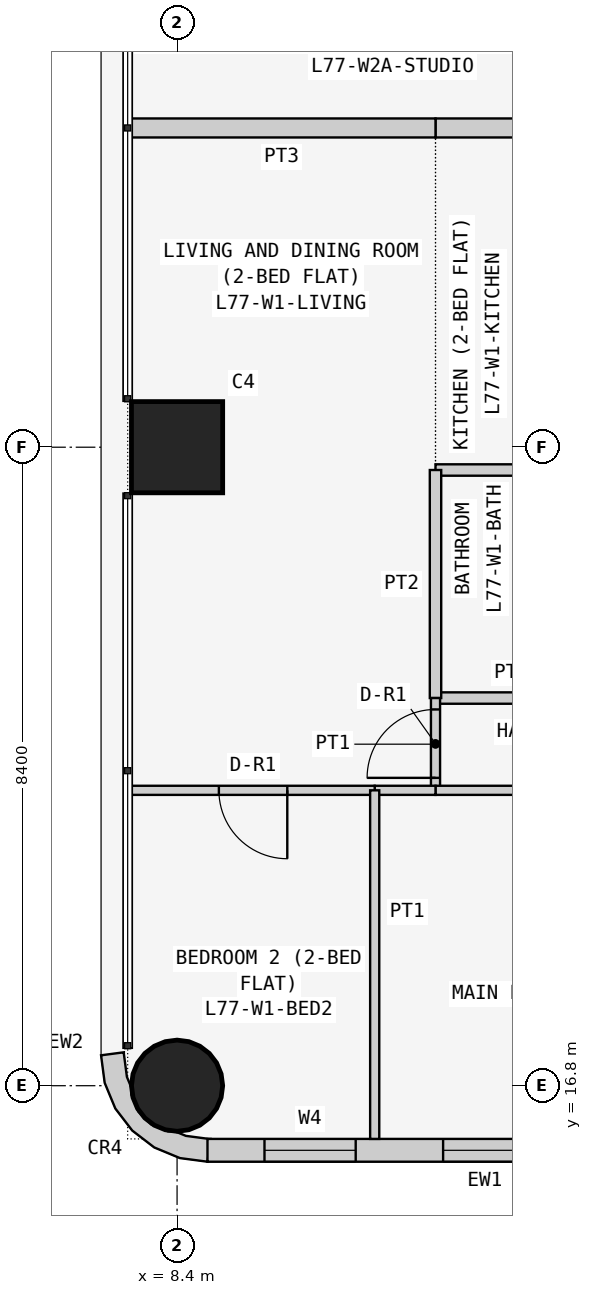
"""IFC4 building model, lengths in metres.
Left out: names, types, materials, properties, quantities, classifications, styles, units other than length and angle.
Written with IfcOpenShell. Run it as: python <this file> out.ifc"""

import sys

from ifc_helpers import new_model, si_unit, direction, frame, frame_2d, origin, origin_2d, place, context, subcontext, project, spatial, polyline, rectangle, circle, outline, extrude, element, fill, save


model = new_model("IFC4")
c1 = context("Model", 3, precision=1e-05, world=origin(), true_north=direction((0.0, 1.0)))
c2 = subcontext(c1, "Body", "Model", "MODEL_VIEW")
j1 = project(units=[si_unit("LENGTHUNIT", "METRE"), si_unit("PLANEANGLEUNIT", "RADIAN")], contexts=[c1])
p1 = place(None, origin())
s1 = spatial("IfcSite", under=j1, at=p1, CompositionType="ELEMENT")
p2 = place(p1, origin())
s2 = spatial("IfcBuilding", under=s1, at=p2, CompositionType="ELEMENT")
p3 = place(p2, frame((0.0, 0.0, 293.7)))
s3 = spatial("IfcBuildingStorey", under=s2, at=p3, CompositionType="ELEMENT", Elevation=293.7)
p4 = place(p3, frame((8.4, 16.8, 0.0), z_axis=(0.0, 0.0, 1.0), x_axis=(1.0, 0.0, 0.0)))
e1 = element("IfcColumn", 1, at=p4, inside=s3, PredefinedType="COLUMN", context=c2, shape_type="SweptSolid", body=[
    extrude(circle(Radius=0.6, at=origin_2d()), origin(), (0.0, 0.0, 1.0), 3.6),
])
p5 = place(p3, frame((8.4, 25.2, 0.0), z_axis=(0.0, 0.0, 1.0), x_axis=(1.0, 0.0, 0.0)))
e2 = element("IfcColumn", 2, at=p5, inside=s3, PredefinedType="COLUMN", context=c2, shape_type="SweptSolid", body=[
    extrude(rectangle(XDim=1.2, YDim=1.2, at=origin_2d()), origin(), (0.0, 0.0, 1.0), 3.6),
])
p6 = place(p3, frame((8.8, 15.95, 0.0), z_axis=(0.0, 0.0, 1.0), x_axis=(1.0, 0.0, 0.0)))
e3 = element("IfcWall", 3, at=p6, inside=s3, PredefinedType="SOLIDWALL", context=c2, shape_type="SweptSolid", body=[
    extrude(rectangle(XDim=7.3, YDim=0.3, at=frame_2d((3.65, 0.0))), origin(), (0.0, 0.0, 1.0), 3.45),
])
p7 = place(p6, frame((3.1, 0.0, 0.9)))
e4 = element("IfcOpeningElement", 4, at=p7, cuts=e3, PredefinedType="OPENING", context=c2, shape_type="SweptSolid", body=[
    extrude(rectangle(XDim=2.4, YDim=1.5, at=frame_2d((1.2, 0.75))), frame((0.0, 0.16, 0.0), z_axis=(0.0, -1.0, 0.0), x_axis=(1.0, 0.0, 0.0)), (0.0, 0.0, 1.0), 0.32),
])
p8 = place(p6, frame((0.75, 0.0, 0.9)))
e5 = element("IfcOpeningElement", 5, at=p8, cuts=e3, PredefinedType="OPENING", context=c2, shape_type="SweptSolid", body=[
    extrude(rectangle(XDim=1.2, YDim=1.5, at=frame_2d((0.6, 0.75))), frame((0.0, 0.16, 0.0), z_axis=(0.0, -1.0, 0.0), x_axis=(1.0, 0.0, 0.0)), (0.0, 0.0, 1.0), 0.32),
])
p9 = place(p3, frame((7.824, 17.162, 0.0), z_axis=(0.0, 0.0, 1.0), x_axis=(-0.707106781187, -0.707106781187, 0.0)))
e6 = element("IfcWall", 6, at=p9, inside=s3, PredefinedType="SOLIDWALL", context=c2, shape_type="SweptSolid", body=[
    extrude(outline(polyline([(0.047, 1.454), (0.233, 1.212), (0.292, 1.069), (0.358, 1.003), (0.449, 0.782), (0.449, 0.543), (0.358, 0.323), (0.292, 0.257), (0.233, 0.114), (0.047, -0.129), (0.033, -0.143), (0.273, -0.327), (0.495, -0.037), (0.635, 0.301), (0.683, 0.663), (0.635, 1.025), (0.495, 1.363), (0.273, 1.653), (0.033, 1.469), (0.047, 1.454)])), origin(), (0.0, 0.0, 1.0), 3.45),
])
p10 = place(p3, frame((11.8, 24.9, 0.0), z_axis=(0.0, 0.0, 1.0), x_axis=(1.0, 0.0, 0.0)))
e7 = element("IfcWall", 7, at=p10, inside=s3, PredefinedType="PARTITIONING", context=c2, shape_type="SweptSolid", body=[
    extrude(rectangle(XDim=2.0, YDim=0.15, at=frame_2d((1.0, 0.0))), origin(), (0.0, 0.0, 1.0), 3.45),
])
p11 = place(p3, frame((13.8, 29.4, 0.0), z_axis=(0.0, 0.0, 1.0), x_axis=(-1.0, 0.0, 0.0)))
e8 = element("IfcWall", 8, at=p11, inside=s3, PredefinedType="PARTITIONING", context=c2, shape_type="SweptSolid", body=[
    extrude(rectangle(XDim=2.0, YDim=0.25, at=frame_2d((1.0, 0.0))), origin(), (0.0, 0.0, 1.0), 3.45),
])
p12 = place(p3, frame((11.8, 21.9, 0.0), z_axis=(0.0, 0.0, 1.0), x_axis=(1.0, 0.0, 0.0)))
e9 = element("IfcWall", 9, at=p12, inside=s3, PredefinedType="PARTITIONING", context=c2, shape_type="SweptSolid", body=[
    extrude(rectangle(XDim=2.0, YDim=0.15, at=frame_2d((1.0, 0.0))), origin(), (0.0, 0.0, 1.0), 3.45),
])
p13 = place(p3, frame((11.8, 24.9, 0.0), z_axis=(0.0, 0.0, 1.0), x_axis=(0.0, -1.0, 0.0)))
e10 = element("IfcWall", 10, at=p13, inside=s3, PredefinedType="PARTITIONING", context=c2, shape_type="SweptSolid", body=[
    extrude(rectangle(XDim=3.0, YDim=0.15, at=frame_2d((1.5, 0.0))), origin(), (0.0, 0.0, 1.0), 3.45),
])
p14 = place(p3, frame((11.8, 21.9, 0.0), z_axis=(0.0, 0.0, 1.0), x_axis=(0.0, -1.0, 0.0)))
e11 = element("IfcWall", 11, at=p14, inside=s3, PredefinedType="PARTITIONING", context=c2, shape_type="SweptSolid", body=[
    extrude(rectangle(XDim=1.214, YDim=0.12, at=frame_2d((0.607, 0.0))), origin(), (0.0, 0.0, 1.0), 3.45),
])
p15 = place(p14, frame((0.15, 0.0, 0.0)))
e12 = element("IfcOpeningElement", 12, at=p15, cuts=e11, PredefinedType="OPENING", context=c2, shape_type="SweptSolid", body=[
    extrude(rectangle(XDim=0.9, YDim=2.1, at=frame_2d((0.45, 1.05))), frame((0.0, 0.07, 0.0), z_axis=(0.0, -1.0, 0.0), x_axis=(1.0, 0.0, 0.0)), (0.0, 0.0, 1.0), 0.14),
])
p16 = place(p3, frame((11.8, 20.686, 0.0), z_axis=(0.0, 0.0, 1.0), x_axis=(1.0, 0.0, 0.0)))
e13 = element("IfcWall", 13, at=p16, inside=s3, PredefinedType="PARTITIONING", context=c2, shape_type="SweptSolid", body=[
    extrude(rectangle(XDim=4.275, YDim=0.12, at=frame_2d((2.137, 0.0))), origin(), (0.0, 0.0, 1.0), 3.45),
])
p17 = place(p16, frame((1.05, 0.0, 0.0)))
e14 = element("IfcOpeningElement", 14, at=p17, cuts=e13, PredefinedType="OPENING", context=c2, shape_type="SweptSolid", body=[
    extrude(rectangle(XDim=0.9, YDim=2.1, at=frame_2d((0.45, 1.05))), frame((0.0, 0.07, 0.0), z_axis=(0.0, -1.0, 0.0), x_axis=(1.0, 0.0, 0.0)), (0.0, 0.0, 1.0), 0.14),
])
p18 = place(p3, frame((11.0, 20.686, 0.0), z_axis=(0.0, 0.0, 1.0), x_axis=(1.0, 0.0, 0.0)))
e15 = element("IfcWall", 15, at=p18, inside=s3, PredefinedType="PARTITIONING", context=c2, shape_type="SweptSolid", body=[
    extrude(rectangle(XDim=0.8, YDim=0.12, at=frame_2d((0.4, 0.0))), origin(), (0.0, 0.0, 1.0), 3.45),
])
p19 = place(p3, frame((7.75, 20.686, 0.0), z_axis=(0.0, 0.0, 1.0), x_axis=(1.0, 0.0, 0.0)))
e16 = element("IfcWall", 16, at=p19, inside=s3, PredefinedType="PARTITIONING", context=c2, shape_type="SweptSolid", body=[
    extrude(rectangle(XDim=3.25, YDim=0.12, at=frame_2d((1.625, 0.0))), origin(), (0.0, 0.0, 1.0), 3.45),
])
p20 = place(p19, frame((1.2, 0.0, 0.0)))
e17 = element("IfcOpeningElement", 17, at=p20, cuts=e16, PredefinedType="OPENING", context=c2, shape_type="SweptSolid", body=[
    extrude(rectangle(XDim=0.9, YDim=2.1, at=frame_2d((0.45, 1.05))), frame((0.0, 0.07, 0.0), z_axis=(0.0, -1.0, 0.0), x_axis=(1.0, 0.0, 0.0)), (0.0, 0.0, 1.0), 0.14),
])
p21 = place(p3, frame((11.8, 29.4, 0.0), z_axis=(0.0, 0.0, 1.0), x_axis=(-1.0, 0.0, 0.0)))
e18 = element("IfcWall", 18, at=p21, inside=s3, PredefinedType="PARTITIONING", context=c2, shape_type="SweptSolid", body=[
    extrude(rectangle(XDim=4.05, YDim=0.25, at=frame_2d((2.025, 0.0))), origin(), (0.0, 0.0, 1.0), 3.45),
])
p22 = place(p3, frame((11.0, 20.686, 0.0), z_axis=(0.0, 0.0, 1.0), x_axis=(0.0, -1.0, 0.0)))
e19 = element("IfcWall", 19, at=p22, inside=s3, PredefinedType="PARTITIONING", context=c2, shape_type="SweptSolid", body=[
    extrude(rectangle(XDim=4.586, YDim=0.12, at=frame_2d((2.293, 0.0))), origin(), (0.0, 0.0, 1.0), 3.45),
])
p23 = place(p7, origin())
e20 = element("IfcWindow", 20, at=p23, inside=s3, PartitioningType="SINGLE_PANEL", PredefinedType="WINDOW", context=c2, shape_type="SweptSolid", body=[
    extrude(rectangle(XDim=2.4, YDim=1.5, at=frame_2d((1.2, 0.75))), frame((0.0, 0.03, 0.0), z_axis=(0.0, -1.0, 0.0), x_axis=(1.0, 0.0, 0.0)), (0.0, 0.0, 1.0), 0.06),
])
fill(e4, e20)
p24 = place(p8, origin())
e21 = element("IfcWindow", 21, at=p24, inside=s3, PartitioningType="SINGLE_PANEL", PredefinedType="WINDOW", context=c2, shape_type="SweptSolid", body=[
    extrude(rectangle(XDim=1.2, YDim=1.5, at=frame_2d((0.6, 0.75))), frame((0.0, 0.03, 0.0), z_axis=(0.0, -1.0, 0.0), x_axis=(1.0, 0.0, 0.0)), (0.0, 0.0, 1.0), 0.06),
])
fill(e5, e21)
p25 = place(p15, frame((0.9, 0.0, 0.0), z_axis=(0.0, 0.0, 1.0), x_axis=(-1.0, 0.0, 0.0)))
e22 = element("IfcDoor", 22, at=p25, inside=s3, OperationType="SINGLE_SWING_LEFT", PredefinedType="DOOR", context=c2, shape_type="SweptSolid", body=[
    extrude(rectangle(XDim=0.9, YDim=2.1, at=frame_2d((0.45, 1.05))), frame((0.0, 0.025, 0.0), z_axis=(0.0, -1.0, 0.0), x_axis=(1.0, 0.0, 0.0)), (0.0, 0.0, 1.0), 0.05),
])
fill(e12, e22)
p26 = place(p20, frame((0.9, 0.0, 0.0), z_axis=(0.0, 0.0, 1.0), x_axis=(-1.0, 0.0, 0.0)))
e23 = element("IfcDoor", 23, at=p26, inside=s3, OperationType="SINGLE_SWING_LEFT", PredefinedType="DOOR", context=c2, shape_type="SweptSolid", body=[
    extrude(rectangle(XDim=0.9, YDim=2.1, at=frame_2d((0.45, 1.05))), frame((0.0, 0.025, 0.0), z_axis=(0.0, -1.0, 0.0), x_axis=(1.0, 0.0, 0.0)), (0.0, 0.0, 1.0), 0.05),
])
fill(e17, e23)
save(model, sys.argv[1])
